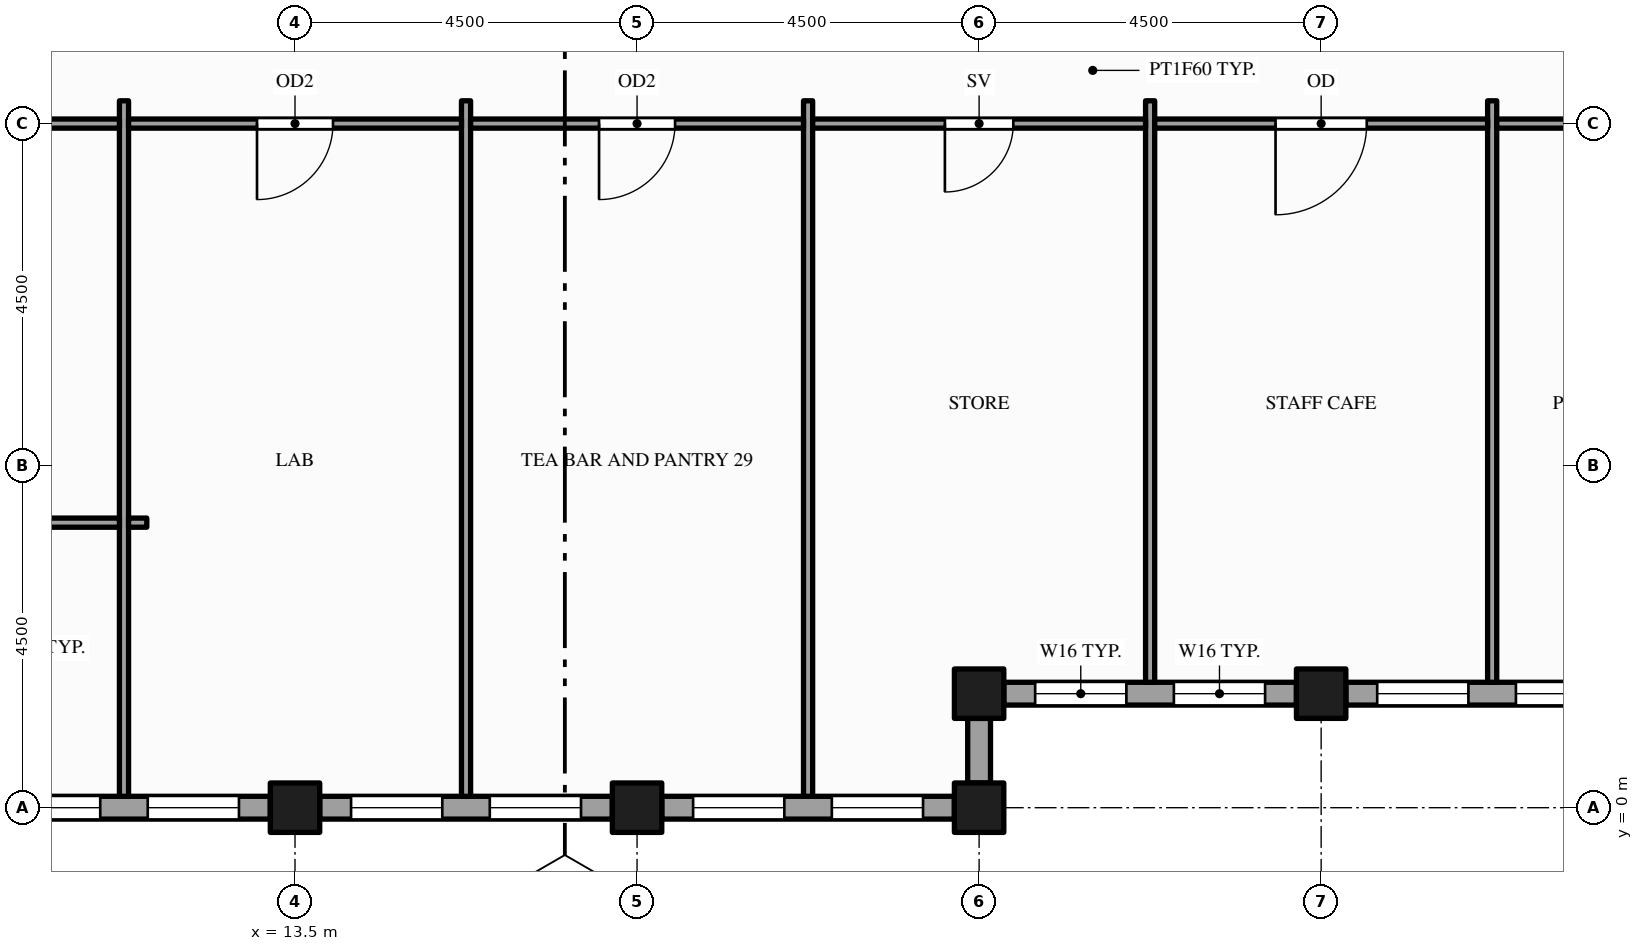
"""IFC4 building model, lengths in metres.
Left out: names, types, materials, properties, quantities, classifications, styles, units other than length and angle.
Written with IfcOpenShell. Run it as: python <this file> out.ifc"""

import sys

from ifc_helpers import new_model, si_unit, direction, frame, frame_2d, origin, origin_2d, place, context, subcontext, project, spatial, rectangle, hollow_rectangle, extrude, element, fill, save


model = new_model("IFC4")
c1 = context("Model", 3, precision=1e-05, world=origin(), true_north=direction((0.0, 1.0)))
c2 = subcontext(c1, "Body", "Model", "MODEL_VIEW")
j1 = project(units=[si_unit("LENGTHUNIT", "METRE"), si_unit("PLANEANGLEUNIT", "RADIAN")], contexts=[c1])
p1 = place(None, origin())
s1 = spatial("IfcSite", under=j1, at=p1, CompositionType="ELEMENT")
p2 = place(p1, origin())
s2 = spatial("IfcBuilding", under=s1, at=p2, CompositionType="ELEMENT")
p3 = place(p2, frame((0.0, 0.0, 289.0)))
s3 = spatial("IfcBuildingStorey", under=s2, at=p3, CompositionType="ELEMENT", Elevation=289.0)
for number, where, z_axis, x_axis in (
    (1, (13.5, 0.0, -0.15), (0.0, 0.0, 1.0), (1.0, 0.0, 0.0)),
    (2, (18.0, 0.0, -0.15), (0.0, 0.0, 1.0), (1.0, 0.0, 0.0)),
    (3, (22.5, 0.0, -0.15), (0.0, 0.0, 1.0), (1.0, 0.0, 0.0)),
    (4, (22.5, 1.5, -0.15), (0.0, 0.0, 1.0), (1.0, 0.0, 0.0)),
    (5, (27.0, 1.5, -0.15), (0.0, 0.0, 1.0), (1.0, 0.0, 0.0)),
):
    element("IfcColumn", number, at=place(p3, frame(where, z_axis=z_axis, x_axis=x_axis)), inside=s3, PredefinedType="COLUMN", context=c2, shape_type="SweptSolid", body=[
        extrude(hollow_rectangle(XDim=0.65, YDim=0.65, WallThickness=0.032, at=origin_2d()), origin(), (0.0, 0.0, 1.0), 4.0),
    ])
p4 = place(p3, frame((22.5, 0.325, 0.0), z_axis=(0.0, 0.0, 1.0), x_axis=(0.0, 1.0, 0.0)))
e6 = element("IfcWall", 6, at=p4, inside=s3, PredefinedType="STANDARD", context=c2, shape_type="SweptSolid", body=[
    extrude(rectangle(XDim=0.85, YDim=0.3, at=frame_2d((0.425, 0.0))), origin(), (0.0, 0.0, 1.0), 3.162),
])
p5 = place(p3, frame((22.825, 1.5, 0.0), z_axis=(0.0, 0.0, 1.0), x_axis=(1.0, 0.0, 0.0)))
e7 = element("IfcWall", 7, at=p5, inside=s3, PredefinedType="STANDARD", context=c2, shape_type="SweptSolid", body=[
    extrude(rectangle(XDim=3.85, YDim=0.3, at=frame_2d((1.925, 0.0))), origin(), (0.0, 0.0, 1.0), 2.87),
])
p6 = place(p5, frame((0.413, 0.0, 0.9)))
e8 = element("IfcOpeningElement", 8, at=p6, cuts=e7, PredefinedType="OPENING", context=c2, shape_type="SweptSolid", body=[
    extrude(rectangle(XDim=1.2, YDim=1.75, at=frame_2d((0.6, 0.875))), frame((0.0, 0.16, 0.0), z_axis=(0.0, -1.0, 0.0), x_axis=(1.0, 0.0, 0.0)), (0.0, 0.0, 1.0), 0.32),
])
p7 = place(p5, frame((2.238, 0.0, 0.9)))
e9 = element("IfcOpeningElement", 9, at=p7, cuts=e7, PredefinedType="OPENING", context=c2, shape_type="SweptSolid", body=[
    extrude(rectangle(XDim=1.2, YDim=1.75, at=frame_2d((0.6, 0.875))), frame((0.0, 0.16, 0.0), z_axis=(0.0, -1.0, 0.0), x_axis=(1.0, 0.0, 0.0)), (0.0, 0.0, 1.0), 0.32),
])
p8 = place(p3, frame((27.325, 1.5, 0.0), z_axis=(0.0, 0.0, 1.0), x_axis=(1.0, 0.0, 0.0)))
e10 = element("IfcWall", 10, at=p8, inside=s3, PredefinedType="STANDARD", context=c2, shape_type="SweptSolid", body=[
    extrude(rectangle(XDim=3.85, YDim=0.3, at=frame_2d((1.925, 0.0))), origin(), (0.0, 0.0, 1.0), 2.87),
])
p9 = place(p8, frame((0.413, 0.0, 0.9)))
e11 = element("IfcOpeningElement", 11, at=p9, cuts=e10, PredefinedType="OPENING", context=c2, shape_type="SweptSolid", body=[
    extrude(rectangle(XDim=1.2, YDim=1.75, at=frame_2d((0.6, 0.875))), frame((0.0, 0.16, 0.0), z_axis=(0.0, -1.0, 0.0), x_axis=(1.0, 0.0, 0.0)), (0.0, 0.0, 1.0), 0.32),
])
p10 = place(p8, frame((2.238, 0.0, 0.9)))
e12 = element("IfcOpeningElement", 12, at=p10, cuts=e10, PredefinedType="OPENING", context=c2, shape_type="SweptSolid", body=[
    extrude(rectangle(XDim=1.2, YDim=1.75, at=frame_2d((0.6, 0.875))), frame((0.0, 0.16, 0.0), z_axis=(0.0, -1.0, 0.0), x_axis=(1.0, 0.0, 0.0)), (0.0, 0.0, 1.0), 0.32),
])
p11 = place(p3, frame((9.325, 0.0, 0.0), z_axis=(0.0, 0.0, 1.0), x_axis=(1.0, 0.0, 0.0)))
e13 = element("IfcWall", 13, at=p11, inside=s3, PredefinedType="STANDARD", context=c2, shape_type="SweptSolid", body=[
    extrude(rectangle(XDim=3.85, YDim=0.3, at=frame_2d((1.925, 0.0))), origin(), (0.0, 0.0, 1.0), 2.87),
])
p12 = place(p11, frame((0.413, 0.0, 0.9)))
e14 = element("IfcOpeningElement", 14, at=p12, cuts=e13, PredefinedType="OPENING", context=c2, shape_type="SweptSolid", body=[
    extrude(rectangle(XDim=1.2, YDim=1.75, at=frame_2d((0.6, 0.875))), frame((0.0, 0.16, 0.0), z_axis=(0.0, -1.0, 0.0), x_axis=(1.0, 0.0, 0.0)), (0.0, 0.0, 1.0), 0.32),
])
p13 = place(p11, frame((2.238, 0.0, 0.9)))
e15 = element("IfcOpeningElement", 15, at=p13, cuts=e13, PredefinedType="OPENING", context=c2, shape_type="SweptSolid", body=[
    extrude(rectangle(XDim=1.2, YDim=1.75, at=frame_2d((0.6, 0.875))), frame((0.0, 0.16, 0.0), z_axis=(0.0, -1.0, 0.0), x_axis=(1.0, 0.0, 0.0)), (0.0, 0.0, 1.0), 0.32),
])
p14 = place(p3, frame((13.825, 0.0, 0.0), z_axis=(0.0, 0.0, 1.0), x_axis=(1.0, 0.0, 0.0)))
e16 = element("IfcWall", 16, at=p14, inside=s3, PredefinedType="STANDARD", context=c2, shape_type="SweptSolid", body=[
    extrude(rectangle(XDim=3.85, YDim=0.3, at=frame_2d((1.925, 0.0))), origin(), (0.0, 0.0, 1.0), 2.87),
])
p15 = place(p14, frame((0.413, 0.0, 0.9)))
e17 = element("IfcOpeningElement", 17, at=p15, cuts=e16, PredefinedType="OPENING", context=c2, shape_type="SweptSolid", body=[
    extrude(rectangle(XDim=1.2, YDim=1.75, at=frame_2d((0.6, 0.875))), frame((0.0, 0.16, 0.0), z_axis=(0.0, -1.0, 0.0), x_axis=(1.0, 0.0, 0.0)), (0.0, 0.0, 1.0), 0.32),
])
p16 = place(p14, frame((2.238, 0.0, 0.9)))
e18 = element("IfcOpeningElement", 18, at=p16, cuts=e16, PredefinedType="OPENING", context=c2, shape_type="SweptSolid", body=[
    extrude(rectangle(XDim=1.2, YDim=1.75, at=frame_2d((0.6, 0.875))), frame((0.0, 0.16, 0.0), z_axis=(0.0, -1.0, 0.0), x_axis=(1.0, 0.0, 0.0)), (0.0, 0.0, 1.0), 0.32),
])
p17 = place(p3, frame((18.325, 0.0, 0.0), z_axis=(0.0, 0.0, 1.0), x_axis=(1.0, 0.0, 0.0)))
e19 = element("IfcWall", 19, at=p17, inside=s3, PredefinedType="STANDARD", context=c2, shape_type="SweptSolid", body=[
    extrude(rectangle(XDim=3.85, YDim=0.3, at=frame_2d((1.925, 0.0))), origin(), (0.0, 0.0, 1.0), 2.87),
])
p18 = place(p17, frame((0.413, 0.0, 0.9)))
e20 = element("IfcOpeningElement", 20, at=p18, cuts=e19, PredefinedType="OPENING", context=c2, shape_type="SweptSolid", body=[
    extrude(rectangle(XDim=1.2, YDim=1.75, at=frame_2d((0.6, 0.875))), frame((0.0, 0.16, 0.0), z_axis=(0.0, -1.0, 0.0), x_axis=(1.0, 0.0, 0.0)), (0.0, 0.0, 1.0), 0.32),
])
p19 = place(p17, frame((2.238, 0.0, 0.9)))
e21 = element("IfcOpeningElement", 21, at=p19, cuts=e19, PredefinedType="OPENING", context=c2, shape_type="SweptSolid", body=[
    extrude(rectangle(XDim=1.2, YDim=1.75, at=frame_2d((0.6, 0.875))), frame((0.0, 0.16, 0.0), z_axis=(0.0, -1.0, 0.0), x_axis=(1.0, 0.0, 0.0)), (0.0, 0.0, 1.0), 0.32),
])
for number, where, z_axis, x_axis in (
    (22, (11.25, 0.15, 0.0), (0.0, 0.0, 1.0), (0.0, 1.0, 0.0)),
    (23, (15.75, 0.15, 0.0), (0.0, 0.0, 1.0), (0.0, 1.0, 0.0)),
    (24, (20.25, 0.15, 0.0), (0.0, 0.0, 1.0), (0.0, 1.0, 0.0)),
):
    element("IfcWall", number, at=place(p3, frame(where, z_axis=z_axis, x_axis=x_axis)), inside=s3, PredefinedType="PARTITIONING", context=c2, shape_type="SweptSolid", body=[
        extrude(rectangle(XDim=9.15, YDim=0.12, at=frame_2d((4.575, 0.0))), origin(), (0.0, 0.0, 1.0), 2.87),
    ])
for number, where, z_axis, x_axis in (
    (25, (24.75, 1.65, 0.0), (0.0, 0.0, 1.0), (0.0, 1.0, 0.0)),
    (26, (29.25, 1.65, 0.0), (0.0, 0.0, 1.0), (0.0, 1.0, 0.0)),
):
    element("IfcWall", number, at=place(p3, frame(where, z_axis=z_axis, x_axis=x_axis)), inside=s3, PredefinedType="PARTITIONING", context=c2, shape_type="SweptSolid", body=[
        extrude(rectangle(XDim=7.65, YDim=0.12, at=frame_2d((3.825, 0.0))), origin(), (0.0, 0.0, 1.0), 2.87),
    ])
p20 = place(p3, frame((9.125, 3.75, 0.0), z_axis=(0.0, 0.0, 1.0), x_axis=(1.0, 0.0, 0.0)))
e27 = element("IfcWall", 27, at=p20, inside=s3, PredefinedType="PARTITIONING", context=c2, shape_type="SweptSolid", body=[
    extrude(rectangle(XDim=2.065, YDim=0.12, at=frame_2d((1.032, 0.0))), origin(), (0.0, 0.0, 1.0), 2.87),
])
p21 = place(p3, frame((11.31, 3.75, 0.0), z_axis=(0.0, 0.0, 1.0), x_axis=(1.0, 0.0, 0.0)))
e28 = element("IfcWall", 28, at=p21, inside=s3, PredefinedType="PARTITIONING", context=c2, shape_type="SweptSolid", body=[
    extrude(rectangle(XDim=0.24, YDim=0.12, at=frame_2d((0.12, 0.0))), origin(), (0.0, 0.0, 1.0), 2.87),
])
p22 = place(p3, frame((0.15, 9.0, 0.0), z_axis=(0.0, 0.0, 1.0), x_axis=(1.0, 0.0, 0.0)))
e29 = element("IfcWall", 29, at=p22, inside=s3, PredefinedType="PARTITIONING", context=c2, shape_type="SweptSolid", body=[
    extrude(rectangle(XDim=11.04, YDim=0.12, at=frame_2d((5.52, 0.0))), origin(), (0.0, 0.0, 1.0), 2.87),
])
p23 = place(p22, frame((4.93, 0.0, 0.0)))
e30 = element("IfcOpeningElement", 30, at=p23, cuts=e29, PredefinedType="OPENING", context=c2, shape_type="SweptSolid", body=[
    extrude(rectangle(XDim=1.2, YDim=2.1, at=frame_2d((0.6, 1.05))), frame((0.0, 0.07, 0.0), z_axis=(0.0, -1.0, 0.0), x_axis=(1.0, 0.0, 0.0)), (0.0, 0.0, 1.0), 0.14),
])
p24 = place(p3, frame((11.31, 9.0, 0.0), z_axis=(0.0, 0.0, 1.0), x_axis=(1.0, 0.0, 0.0)))
e31 = element("IfcWall", 31, at=p24, inside=s3, PredefinedType="PARTITIONING", context=c2, shape_type="SweptSolid", body=[
    extrude(rectangle(XDim=4.38, YDim=0.12, at=frame_2d((2.19, 0.0))), origin(), (0.0, 0.0, 1.0), 2.87),
])
p25 = place(p24, frame((1.69, 0.0, 0.0)))
e32 = element("IfcOpeningElement", 32, at=p25, cuts=e31, PredefinedType="OPENING", context=c2, shape_type="SweptSolid", body=[
    extrude(rectangle(XDim=1.0, YDim=2.1, at=frame_2d((0.5, 1.05))), frame((0.0, 0.07, 0.0), z_axis=(0.0, -1.0, 0.0), x_axis=(1.0, 0.0, 0.0)), (0.0, 0.0, 1.0), 0.14),
])
p26 = place(p3, frame((15.81, 9.0, 0.0), z_axis=(0.0, 0.0, 1.0), x_axis=(1.0, 0.0, 0.0)))
e33 = element("IfcWall", 33, at=p26, inside=s3, PredefinedType="PARTITIONING", context=c2, shape_type="SweptSolid", body=[
    extrude(rectangle(XDim=4.38, YDim=0.12, at=frame_2d((2.19, 0.0))), origin(), (0.0, 0.0, 1.0), 2.87),
])
p27 = place(p26, frame((1.69, 0.0, 0.0)))
e34 = element("IfcOpeningElement", 34, at=p27, cuts=e33, PredefinedType="OPENING", context=c2, shape_type="SweptSolid", body=[
    extrude(rectangle(XDim=1.0, YDim=2.1, at=frame_2d((0.5, 1.05))), frame((0.0, 0.07, 0.0), z_axis=(0.0, -1.0, 0.0), x_axis=(1.0, 0.0, 0.0)), (0.0, 0.0, 1.0), 0.14),
])
p28 = place(p3, frame((20.31, 9.0, 0.0), z_axis=(0.0, 0.0, 1.0), x_axis=(1.0, 0.0, 0.0)))
e35 = element("IfcWall", 35, at=p28, inside=s3, PredefinedType="PARTITIONING", context=c2, shape_type="SweptSolid", body=[
    extrude(rectangle(XDim=4.38, YDim=0.12, at=frame_2d((2.19, 0.0))), origin(), (0.0, 0.0, 1.0), 2.87),
])
p29 = place(p28, frame((1.74, 0.0, 0.0)))
e36 = element("IfcOpeningElement", 36, at=p29, cuts=e35, PredefinedType="OPENING", context=c2, shape_type="SweptSolid", body=[
    extrude(rectangle(XDim=0.9, YDim=2.1, at=frame_2d((0.45, 1.05))), frame((0.0, 0.07, 0.0), z_axis=(0.0, -1.0, 0.0), x_axis=(1.0, 0.0, 0.0)), (0.0, 0.0, 1.0), 0.14),
])
p30 = place(p3, frame((24.81, 9.0, 0.0), z_axis=(0.0, 0.0, 1.0), x_axis=(1.0, 0.0, 0.0)))
e37 = element("IfcWall", 37, at=p30, inside=s3, PredefinedType="PARTITIONING", context=c2, shape_type="SweptSolid", body=[
    extrude(rectangle(XDim=4.38, YDim=0.12, at=frame_2d((2.19, 0.0))), origin(), (0.0, 0.0, 1.0), 2.87),
])
p31 = place(p30, frame((1.59, 0.0, 0.0)))
e38 = element("IfcOpeningElement", 38, at=p31, cuts=e37, PredefinedType="OPENING", context=c2, shape_type="SweptSolid", body=[
    extrude(rectangle(XDim=1.2, YDim=2.1, at=frame_2d((0.6, 1.05))), frame((0.0, 0.07, 0.0), z_axis=(0.0, -1.0, 0.0), x_axis=(1.0, 0.0, 0.0)), (0.0, 0.0, 1.0), 0.14),
])
p32 = place(p3, frame((29.31, 9.0, 0.0), z_axis=(0.0, 0.0, 1.0), x_axis=(1.0, 0.0, 0.0)))
e39 = element("IfcWall", 39, at=p32, inside=s3, PredefinedType="PARTITIONING", context=c2, shape_type="SweptSolid", body=[
    extrude(rectangle(XDim=4.38, YDim=0.12, at=frame_2d((2.19, 0.0))), origin(), (0.0, 0.0, 1.0), 2.87),
])
p33 = place(p32, frame((1.74, 0.0, 0.0)))
e40 = element("IfcOpeningElement", 40, at=p33, cuts=e39, PredefinedType="OPENING", context=c2, shape_type="SweptSolid", body=[
    extrude(rectangle(XDim=0.9, YDim=2.1, at=frame_2d((0.45, 1.05))), frame((0.0, 0.07, 0.0), z_axis=(0.0, -1.0, 0.0), x_axis=(1.0, 0.0, 0.0)), (0.0, 0.0, 1.0), 0.14),
])
p34 = place(p6, origin())
e41 = element("IfcWindow", 41, at=p34, inside=s3, PartitioningType="SINGLE_PANEL", PredefinedType="WINDOW", context=c2, shape_type="SweptSolid", body=[
    extrude(rectangle(XDim=1.2, YDim=1.75, at=frame_2d((0.6, 0.875))), frame((0.0, 0.03, 0.0), z_axis=(0.0, -1.0, 0.0), x_axis=(1.0, 0.0, 0.0)), (0.0, 0.0, 1.0), 0.06),
])
fill(e8, e41)
p35 = place(p7, origin())
e42 = element("IfcWindow", 42, at=p35, inside=s3, PartitioningType="SINGLE_PANEL", PredefinedType="WINDOW", context=c2, shape_type="SweptSolid", body=[
    extrude(rectangle(XDim=1.2, YDim=1.75, at=frame_2d((0.6, 0.875))), frame((0.0, 0.03, 0.0), z_axis=(0.0, -1.0, 0.0), x_axis=(1.0, 0.0, 0.0)), (0.0, 0.0, 1.0), 0.06),
])
fill(e9, e42)
p36 = place(p9, origin())
e43 = element("IfcWindow", 43, at=p36, inside=s3, PartitioningType="SINGLE_PANEL", PredefinedType="WINDOW", context=c2, shape_type="SweptSolid", body=[
    extrude(rectangle(XDim=1.2, YDim=1.75, at=frame_2d((0.6, 0.875))), frame((0.0, 0.03, 0.0), z_axis=(0.0, -1.0, 0.0), x_axis=(1.0, 0.0, 0.0)), (0.0, 0.0, 1.0), 0.06),
])
fill(e11, e43)
p37 = place(p10, origin())
e44 = element("IfcWindow", 44, at=p37, inside=s3, PartitioningType="SINGLE_PANEL", PredefinedType="WINDOW", context=c2, shape_type="SweptSolid", body=[
    extrude(rectangle(XDim=1.2, YDim=1.75, at=frame_2d((0.6, 0.875))), frame((0.0, 0.03, 0.0), z_axis=(0.0, -1.0, 0.0), x_axis=(1.0, 0.0, 0.0)), (0.0, 0.0, 1.0), 0.06),
])
fill(e12, e44)
p38 = place(p12, origin())
e45 = element("IfcWindow", 45, at=p38, inside=s3, PartitioningType="SINGLE_PANEL", PredefinedType="WINDOW", context=c2, shape_type="SweptSolid", body=[
    extrude(rectangle(XDim=1.2, YDim=1.75, at=frame_2d((0.6, 0.875))), frame((0.0, 0.03, 0.0), z_axis=(0.0, -1.0, 0.0), x_axis=(1.0, 0.0, 0.0)), (0.0, 0.0, 1.0), 0.06),
])
fill(e14, e45)
p39 = place(p13, origin())
e46 = element("IfcWindow", 46, at=p39, inside=s3, PartitioningType="SINGLE_PANEL", PredefinedType="WINDOW", context=c2, shape_type="SweptSolid", body=[
    extrude(rectangle(XDim=1.2, YDim=1.75, at=frame_2d((0.6, 0.875))), frame((0.0, 0.03, 0.0), z_axis=(0.0, -1.0, 0.0), x_axis=(1.0, 0.0, 0.0)), (0.0, 0.0, 1.0), 0.06),
])
fill(e15, e46)
p40 = place(p15, origin())
e47 = element("IfcWindow", 47, at=p40, inside=s3, PartitioningType="SINGLE_PANEL", PredefinedType="WINDOW", context=c2, shape_type="SweptSolid", body=[
    extrude(rectangle(XDim=1.2, YDim=1.75, at=frame_2d((0.6, 0.875))), frame((0.0, 0.03, 0.0), z_axis=(0.0, -1.0, 0.0), x_axis=(1.0, 0.0, 0.0)), (0.0, 0.0, 1.0), 0.06),
])
fill(e17, e47)
p41 = place(p16, origin())
e48 = element("IfcWindow", 48, at=p41, inside=s3, PartitioningType="SINGLE_PANEL", PredefinedType="WINDOW", context=c2, shape_type="SweptSolid", body=[
    extrude(rectangle(XDim=1.2, YDim=1.75, at=frame_2d((0.6, 0.875))), frame((0.0, 0.03, 0.0), z_axis=(0.0, -1.0, 0.0), x_axis=(1.0, 0.0, 0.0)), (0.0, 0.0, 1.0), 0.06),
])
fill(e18, e48)
p42 = place(p18, origin())
e49 = element("IfcWindow", 49, at=p42, inside=s3, PartitioningType="SINGLE_PANEL", PredefinedType="WINDOW", context=c2, shape_type="SweptSolid", body=[
    extrude(rectangle(XDim=1.2, YDim=1.75, at=frame_2d((0.6, 0.875))), frame((0.0, 0.03, 0.0), z_axis=(0.0, -1.0, 0.0), x_axis=(1.0, 0.0, 0.0)), (0.0, 0.0, 1.0), 0.06),
])
fill(e20, e49)
p43 = place(p19, origin())
e50 = element("IfcWindow", 50, at=p43, inside=s3, PartitioningType="SINGLE_PANEL", PredefinedType="WINDOW", context=c2, shape_type="SweptSolid", body=[
    extrude(rectangle(XDim=1.2, YDim=1.75, at=frame_2d((0.6, 0.875))), frame((0.0, 0.03, 0.0), z_axis=(0.0, -1.0, 0.0), x_axis=(1.0, 0.0, 0.0)), (0.0, 0.0, 1.0), 0.06),
])
fill(e21, e50)
p44 = place(p25, origin())
e51 = element("IfcDoor", 51, at=p44, inside=s3, OperationType="SINGLE_SWING_LEFT", PredefinedType="DOOR", context=c2, shape_type="SweptSolid", body=[
    extrude(rectangle(XDim=1.0, YDim=2.1, at=frame_2d((0.5, 1.05))), frame((0.0, 0.025, 0.0), z_axis=(0.0, -1.0, 0.0), x_axis=(1.0, 0.0, 0.0)), (0.0, 0.0, 1.0), 0.05),
])
fill(e32, e51)
p45 = place(p27, origin())
e52 = element("IfcDoor", 52, at=p45, inside=s3, OperationType="SINGLE_SWING_LEFT", PredefinedType="DOOR", context=c2, shape_type="SweptSolid", body=[
    extrude(rectangle(XDim=1.0, YDim=2.1, at=frame_2d((0.5, 1.05))), frame((0.0, 0.025, 0.0), z_axis=(0.0, -1.0, 0.0), x_axis=(1.0, 0.0, 0.0)), (0.0, 0.0, 1.0), 0.05),
])
fill(e34, e52)
p46 = place(p29, origin())
e53 = element("IfcDoor", 53, at=p46, inside=s3, OperationType="SINGLE_SWING_LEFT", PredefinedType="DOOR", context=c2, shape_type="SweptSolid", body=[
    extrude(rectangle(XDim=0.9, YDim=2.1, at=frame_2d((0.45, 1.05))), frame((0.0, 0.025, 0.0), z_axis=(0.0, -1.0, 0.0), x_axis=(1.0, 0.0, 0.0)), (0.0, 0.0, 1.0), 0.05),
])
fill(e36, e53)
p47 = place(p31, origin())
e54 = element("IfcDoor", 54, at=p47, inside=s3, OperationType="SINGLE_SWING_LEFT", PredefinedType="DOOR", context=c2, shape_type="SweptSolid", body=[
    extrude(rectangle(XDim=1.2, YDim=2.1, at=frame_2d((0.6, 1.05))), frame((0.0, 0.025, 0.0), z_axis=(0.0, -1.0, 0.0), x_axis=(1.0, 0.0, 0.0)), (0.0, 0.0, 1.0), 0.05),
])
fill(e38, e54)
save(model, sys.argv[1])
